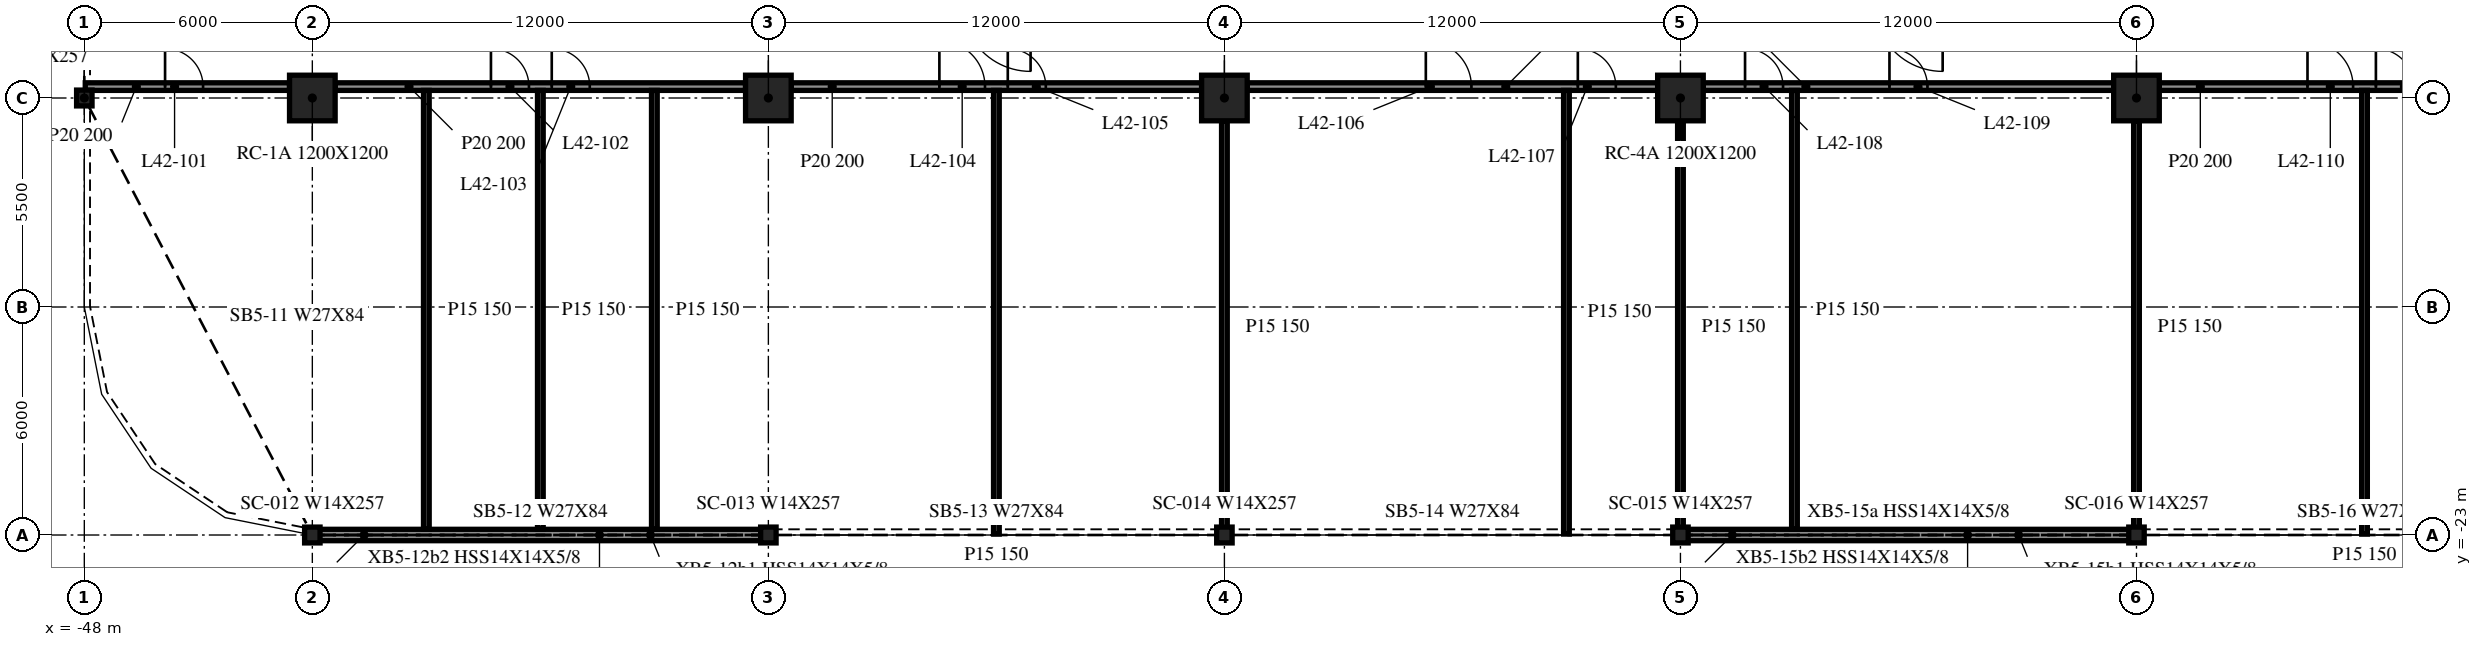
"""IFC4 building model, lengths in metres.
Left out: names, types, materials, properties, quantities, classifications, styles, units other than length and angle.
Written with IfcOpenShell. Run it as: python <this file> out.ifc"""

import sys

from ifc_helpers import new_model, si_unit, direction, frame, frame_2d, origin, origin_2d, place, context, subcontext, project, spatial, rectangle, i_section, extrude, element, fill, save


model = new_model("IFC4")
c1 = context("Model", 3, precision=1e-05, world=origin(), true_north=direction((0.0, 1.0)))
c2 = subcontext(c1, "Body", "Model", "MODEL_VIEW")
j1 = project(units=[si_unit("LENGTHUNIT", "METRE"), si_unit("PLANEANGLEUNIT", "RADIAN")], contexts=[c1])
p1 = place(None, origin())
s1 = spatial("IfcSite", under=j1, at=p1, CompositionType="ELEMENT")
p2 = place(p1, origin())
s2 = spatial("IfcBuilding", under=s1, at=p2, CompositionType="ELEMENT")
p3 = place(p2, frame((0.0, 0.0, 178.2)))
s3 = spatial("IfcBuildingStorey", under=s2, at=p3, CompositionType="ELEMENT", Elevation=178.2)
for number, where, z_axis, x_axis in (
    (1, (-42.0, -11.5, -0.34), (0.0, 0.0, 1.0), (1.0, 0.0, 0.0)),
    (2, (-30.0, -11.5, -0.34), (0.0, 0.0, 1.0), (1.0, 0.0, 0.0)),
    (3, (-18.0, -11.5, -0.34), (0.0, 0.0, 1.0), (1.0, 0.0, 0.0)),
    (4, (-6.0, -11.5, -0.34), (0.0, 0.0, 1.0), (1.0, 0.0, 0.0)),
    (5, (6.0, -11.5, -0.34), (0.0, 0.0, 1.0), (1.0, 0.0, 0.0)),
):
    element("IfcColumn", number, at=place(p3, frame(where, z_axis=z_axis, x_axis=x_axis)), inside=s3, PredefinedType="COLUMN", context=c2, shape_type="SweptSolid", body=[
        extrude(rectangle(XDim=1.2, YDim=1.2, at=origin_2d()), origin(), (0.0, 0.0, 1.0), 3.8),
    ])
for number, where, z_axis, x_axis in (
    (6, (-48.0, -11.5, -0.34), (0.0, 0.0, 1.0), (1.0, 0.0, 0.0)),
    (7, (-42.0, -23.0, -0.34), (0.0, 0.0, 1.0), (1.0, 0.0, 0.0)),
    (8, (-30.0, -23.0, -0.34), (0.0, 0.0, 1.0), (1.0, 0.0, 0.0)),
    (9, (-18.0, -23.0, -0.34), (0.0, 0.0, 1.0), (1.0, 0.0, 0.0)),
    (10, (-6.0, -23.0, -0.34), (0.0, 0.0, 1.0), (1.0, 0.0, 0.0)),
    (11, (6.0, -23.0, -0.34), (0.0, 0.0, 1.0), (1.0, 0.0, 0.0)),
):
    element("IfcColumn", number, at=place(p3, frame(where, z_axis=z_axis, x_axis=x_axis)), inside=s3, PredefinedType="COLUMN", context=c2, shape_type="SweptSolid", body=[
        extrude(i_section(OverallWidth=0.406, OverallDepth=0.417, WebThickness=0.03, FlangeThickness=0.048, at=origin_2d()), origin(), (0.0, 0.0, 1.0), 3.8),
    ])
for number, where, z_axis, x_axis in (
    (12, (-41.985, -23.0, 0.0), (0.0, 0.0, 1.0), (1.0, 0.0, 0.0)),
    (13, (-5.985, -23.0, 0.0), (0.0, 0.0, 1.0), (1.0, 0.0, 0.0)),
):
    element("IfcWall", number, at=place(p3, frame(where, z_axis=z_axis, x_axis=x_axis)), inside=s3, PredefinedType="NOTDEFINED", context=c2, shape_type="SweptSolid", body=[
        extrude(rectangle(XDim=11.97, YDim=0.3, at=frame_2d((5.985, 0.0))), origin(), (0.0, 0.0, 1.0), 2.782),
    ])
p4 = place(p3, frame((-47.975, -11.2, 0.0), z_axis=(0.0, 0.0, 1.0), x_axis=(1.0, 0.0, 0.0)))
e14 = element("IfcWall", 14, at=p4, inside=s3, PredefinedType="PARTITIONING", context=c2, shape_type="SweptSolid", body=[
    extrude(rectangle(XDim=5.375, YDim=0.2, at=frame_2d((2.688, 0.0))), origin(), (0.0, 0.0, 1.0), 3.46),
])
p5 = place(p4, frame((2.1, 0.0, 0.0)))
e15 = element("IfcOpeningElement", 15, at=p5, cuts=e14, PredefinedType="OPENING", context=c2, shape_type="SweptSolid", body=[
    extrude(rectangle(XDim=1.0, YDim=2.1, at=frame_2d((0.5, 1.05))), frame((0.0, 0.11, 0.0), z_axis=(0.0, -1.0, 0.0), x_axis=(1.0, 0.0, 0.0)), (0.0, 0.0, 1.0), 0.22),
])
p6 = place(p3, frame((-41.4, -11.2, 0.0), z_axis=(0.0, 0.0, 1.0), x_axis=(1.0, 0.0, 0.0)))
e16 = element("IfcWall", 16, at=p6, inside=s3, PredefinedType="PARTITIONING", context=c2, shape_type="SweptSolid", body=[
    extrude(rectangle(XDim=10.8, YDim=0.2, at=frame_2d((5.4, 0.0))), origin(), (0.0, 0.0, 1.0), 3.46),
])
p7 = place(p6, frame((4.1, 0.0, 0.0)))
e17 = element("IfcOpeningElement", 17, at=p7, cuts=e16, PredefinedType="OPENING", context=c2, shape_type="SweptSolid", body=[
    extrude(rectangle(XDim=1.0, YDim=2.1, at=frame_2d((0.5, 1.05))), frame((0.0, 0.11, 0.0), z_axis=(0.0, -1.0, 0.0), x_axis=(1.0, 0.0, 0.0)), (0.0, 0.0, 1.0), 0.22),
])
p8 = place(p6, frame((5.7, 0.0, 0.0)))
e18 = element("IfcOpeningElement", 18, at=p8, cuts=e16, PredefinedType="OPENING", context=c2, shape_type="SweptSolid", body=[
    extrude(rectangle(XDim=1.0, YDim=2.1, at=frame_2d((0.5, 1.05))), frame((0.0, 0.11, 0.0), z_axis=(0.0, -1.0, 0.0), x_axis=(1.0, 0.0, 0.0)), (0.0, 0.0, 1.0), 0.22),
])
p9 = place(p3, frame((-29.4, -11.2, 0.0), z_axis=(0.0, 0.0, 1.0), x_axis=(1.0, 0.0, 0.0)))
e19 = element("IfcWall", 19, at=p9, inside=s3, PredefinedType="PARTITIONING", context=c2, shape_type="SweptSolid", body=[
    extrude(rectangle(XDim=10.8, YDim=0.2, at=frame_2d((5.4, 0.0))), origin(), (0.0, 0.0, 1.0), 3.46),
])
p10 = place(p9, frame((3.9, 0.0, 0.0)))
e20 = element("IfcOpeningElement", 20, at=p10, cuts=e19, PredefinedType="OPENING", context=c2, shape_type="SweptSolid", body=[
    extrude(rectangle(XDim=1.2, YDim=2.1, at=frame_2d((0.6, 1.05))), frame((0.0, 0.11, 0.0), z_axis=(0.0, -1.0, 0.0), x_axis=(1.0, 0.0, 0.0)), (0.0, 0.0, 1.0), 0.22),
])
p11 = place(p9, frame((5.7, 0.0, 0.0)))
e21 = element("IfcOpeningElement", 21, at=p11, cuts=e19, PredefinedType="OPENING", context=c2, shape_type="SweptSolid", body=[
    extrude(rectangle(XDim=1.0, YDim=2.1, at=frame_2d((0.5, 1.05))), frame((0.0, 0.11, 0.0), z_axis=(0.0, -1.0, 0.0), x_axis=(1.0, 0.0, 0.0)), (0.0, 0.0, 1.0), 0.22),
])
p12 = place(p3, frame((-17.4, -11.2, 0.0), z_axis=(0.0, 0.0, 1.0), x_axis=(1.0, 0.0, 0.0)))
e22 = element("IfcWall", 22, at=p12, inside=s3, PredefinedType="PARTITIONING", context=c2, shape_type="SweptSolid", body=[
    extrude(rectangle(XDim=10.8, YDim=0.2, at=frame_2d((5.4, 0.0))), origin(), (0.0, 0.0, 1.0), 3.46),
])
p13 = place(p12, frame((4.7, 0.0, 0.0)))
e23 = element("IfcOpeningElement", 23, at=p13, cuts=e22, PredefinedType="OPENING", context=c2, shape_type="SweptSolid", body=[
    extrude(rectangle(XDim=1.2, YDim=2.1, at=frame_2d((0.6, 1.05))), frame((0.0, 0.11, 0.0), z_axis=(0.0, -1.0, 0.0), x_axis=(1.0, 0.0, 0.0)), (0.0, 0.0, 1.0), 0.22),
])
p14 = place(p12, frame((8.7, 0.0, 0.0)))
e24 = element("IfcOpeningElement", 24, at=p14, cuts=e22, PredefinedType="OPENING", context=c2, shape_type="SweptSolid", body=[
    extrude(rectangle(XDim=1.0, YDim=2.1, at=frame_2d((0.5, 1.05))), frame((0.0, 0.11, 0.0), z_axis=(0.0, -1.0, 0.0), x_axis=(1.0, 0.0, 0.0)), (0.0, 0.0, 1.0), 0.22),
])
p15 = place(p3, frame((-5.4, -11.2, 0.0), z_axis=(0.0, 0.0, 1.0), x_axis=(1.0, 0.0, 0.0)))
e25 = element("IfcWall", 25, at=p15, inside=s3, PredefinedType="PARTITIONING", context=c2, shape_type="SweptSolid", body=[
    extrude(rectangle(XDim=10.8, YDim=0.2, at=frame_2d((5.4, 0.0))), origin(), (0.0, 0.0, 1.0), 3.46),
])
p16 = place(p15, frame((1.1, 0.0, 0.0)))
e26 = element("IfcOpeningElement", 26, at=p16, cuts=e25, PredefinedType="OPENING", context=c2, shape_type="SweptSolid", body=[
    extrude(rectangle(XDim=1.0, YDim=2.1, at=frame_2d((0.5, 1.05))), frame((0.0, 0.11, 0.0), z_axis=(0.0, -1.0, 0.0), x_axis=(1.0, 0.0, 0.0)), (0.0, 0.0, 1.0), 0.22),
])
p17 = place(p15, frame((4.9, 0.0, 0.0)))
e27 = element("IfcOpeningElement", 27, at=p17, cuts=e25, PredefinedType="OPENING", context=c2, shape_type="SweptSolid", body=[
    extrude(rectangle(XDim=1.0, YDim=2.1, at=frame_2d((0.5, 1.05))), frame((0.0, 0.11, 0.0), z_axis=(0.0, -1.0, 0.0), x_axis=(1.0, 0.0, 0.0)), (0.0, 0.0, 1.0), 0.22),
])
p18 = place(p3, frame((6.6, -11.2, 0.0), z_axis=(0.0, 0.0, 1.0), x_axis=(1.0, 0.0, 0.0)))
e28 = element("IfcWall", 28, at=p18, inside=s3, PredefinedType="PARTITIONING", context=c2, shape_type="SweptSolid", body=[
    extrude(rectangle(XDim=10.8, YDim=0.2, at=frame_2d((5.4, 0.0))), origin(), (0.0, 0.0, 1.0), 3.46),
])
p19 = place(p18, frame((3.9, 0.0, 0.0)))
e29 = element("IfcOpeningElement", 29, at=p19, cuts=e28, PredefinedType="OPENING", context=c2, shape_type="SweptSolid", body=[
    extrude(rectangle(XDim=1.2, YDim=2.1, at=frame_2d((0.6, 1.05))), frame((0.0, 0.11, 0.0), z_axis=(0.0, -1.0, 0.0), x_axis=(1.0, 0.0, 0.0)), (0.0, 0.0, 1.0), 0.22),
])
p20 = place(p18, frame((5.7, 0.0, 0.0)))
e30 = element("IfcOpeningElement", 30, at=p20, cuts=e28, PredefinedType="OPENING", context=c2, shape_type="SweptSolid", body=[
    extrude(rectangle(XDim=1.0, YDim=2.1, at=frame_2d((0.5, 1.05))), frame((0.0, 0.11, 0.0), z_axis=(0.0, -1.0, 0.0), x_axis=(1.0, 0.0, 0.0)), (0.0, 0.0, 1.0), 0.22),
])
for number, where, z_axis, x_axis in (
    (31, (-39.0, -22.85, 0.0), (0.0, 0.0, 1.0), (0.0, 1.0, 0.0)),
    (32, (-36.0, -22.85, 0.0), (0.0, 0.0, 1.0), (0.0, 1.0, 0.0)),
    (33, (-33.0, -22.85, 0.0), (0.0, 0.0, 1.0), (0.0, 1.0, 0.0)),
):
    element("IfcWall", number, at=place(p3, frame(where, z_axis=z_axis, x_axis=x_axis)), inside=s3, PredefinedType="PARTITIONING", context=c2, shape_type="SweptSolid", body=[
        extrude(rectangle(XDim=11.55, YDim=0.15, at=frame_2d((5.775, 0.0))), origin(), (0.0, 0.0, 1.0), 3.46),
    ])
p21 = place(p3, frame((-24.0, -22.975, 0.0), z_axis=(0.0, 0.0, 1.0), x_axis=(0.0, 1.0, 0.0)))
e34 = element("IfcWall", 34, at=p21, inside=s3, PredefinedType="PARTITIONING", context=c2, shape_type="SweptSolid", body=[
    extrude(rectangle(XDim=11.675, YDim=0.15, at=frame_2d((5.837, 0.0))), origin(), (0.0, 0.0, 1.0), 3.46),
])
p22 = place(p3, frame((-18.0, -22.975, 0.0), z_axis=(0.0, 0.0, 1.0), x_axis=(0.0, 1.0, 0.0)))
e35 = element("IfcWall", 35, at=p22, inside=s3, PredefinedType="PARTITIONING", context=c2, shape_type="SweptSolid", body=[
    extrude(rectangle(XDim=10.875, YDim=0.15, at=frame_2d((5.438, 0.0))), origin(), (0.0, 0.0, 1.0), 3.46),
])
p23 = place(p3, frame((-9.0, -22.975, 0.0), z_axis=(0.0, 0.0, 1.0), x_axis=(0.0, 1.0, 0.0)))
e36 = element("IfcWall", 36, at=p23, inside=s3, PredefinedType="PARTITIONING", context=c2, shape_type="SweptSolid", body=[
    extrude(rectangle(XDim=11.675, YDim=0.15, at=frame_2d((5.837, 0.0))), origin(), (0.0, 0.0, 1.0), 3.46),
])
p24 = place(p3, frame((-6.0, -22.975, 0.0), z_axis=(0.0, 0.0, 1.0), x_axis=(0.0, 1.0, 0.0)))
e37 = element("IfcWall", 37, at=p24, inside=s3, PredefinedType="PARTITIONING", context=c2, shape_type="SweptSolid", body=[
    extrude(rectangle(XDim=10.875, YDim=0.15, at=frame_2d((5.438, 0.0))), origin(), (0.0, 0.0, 1.0), 3.46),
])
p25 = place(p3, frame((-3.0, -22.85, 0.0), z_axis=(0.0, 0.0, 1.0), x_axis=(0.0, 1.0, 0.0)))
e38 = element("IfcWall", 38, at=p25, inside=s3, PredefinedType="PARTITIONING", context=c2, shape_type="SweptSolid", body=[
    extrude(rectangle(XDim=11.55, YDim=0.15, at=frame_2d((5.775, 0.0))), origin(), (0.0, 0.0, 1.0), 3.46),
])
p26 = place(p3, frame((6.0, -22.975, 0.0), z_axis=(0.0, 0.0, 1.0), x_axis=(0.0, 1.0, 0.0)))
e39 = element("IfcWall", 39, at=p26, inside=s3, PredefinedType="PARTITIONING", context=c2, shape_type="SweptSolid", body=[
    extrude(rectangle(XDim=10.875, YDim=0.15, at=frame_2d((5.438, 0.0))), origin(), (0.0, 0.0, 1.0), 3.46),
])
p27 = place(p3, frame((12.0, -22.975, 0.0), z_axis=(0.0, 0.0, 1.0), x_axis=(0.0, 1.0, 0.0)))
e40 = element("IfcWall", 40, at=p27, inside=s3, PredefinedType="PARTITIONING", context=c2, shape_type="SweptSolid", body=[
    extrude(rectangle(XDim=11.675, YDim=0.15, at=frame_2d((5.837, 0.0))), origin(), (0.0, 0.0, 1.0), 3.46),
])
p28 = place(p5, origin())
e41 = element("IfcDoor", 41, at=p28, inside=s3, OperationType="SINGLE_SWING_RIGHT", PredefinedType="DOOR", context=c2, shape_type="SweptSolid", body=[
    extrude(rectangle(XDim=1.0, YDim=2.1, at=frame_2d((0.5, 1.05))), frame((0.0, 0.025, 0.0), z_axis=(0.0, -1.0, 0.0), x_axis=(1.0, 0.0, 0.0)), (0.0, 0.0, 1.0), 0.05),
])
fill(e15, e41)
p29 = place(p7, origin())
e42 = element("IfcDoor", 42, at=p29, inside=s3, OperationType="SINGLE_SWING_RIGHT", PredefinedType="DOOR", context=c2, shape_type="SweptSolid", body=[
    extrude(rectangle(XDim=1.0, YDim=2.1, at=frame_2d((0.5, 1.05))), frame((0.0, 0.025, 0.0), z_axis=(0.0, -1.0, 0.0), x_axis=(1.0, 0.0, 0.0)), (0.0, 0.0, 1.0), 0.05),
])
fill(e17, e42)
p30 = place(p8, origin())
e43 = element("IfcDoor", 43, at=p30, inside=s3, OperationType="SINGLE_SWING_LEFT", PredefinedType="DOOR", context=c2, shape_type="SweptSolid", body=[
    extrude(rectangle(XDim=1.0, YDim=2.1, at=frame_2d((0.5, 1.05))), frame((0.0, 0.025, 0.0), z_axis=(0.0, -1.0, 0.0), x_axis=(1.0, 0.0, 0.0)), (0.0, 0.0, 1.0), 0.05),
])
fill(e18, e43)
p31 = place(p10, origin())
e44 = element("IfcDoor", 44, at=p31, inside=s3, OperationType="SINGLE_SWING_RIGHT", PredefinedType="DOOR", context=c2, shape_type="SweptSolid", body=[
    extrude(rectangle(XDim=1.2, YDim=2.1, at=frame_2d((0.6, 1.05))), frame((0.0, 0.025, 0.0), z_axis=(0.0, -1.0, 0.0), x_axis=(1.0, 0.0, 0.0)), (0.0, 0.0, 1.0), 0.05),
])
fill(e20, e44)
p32 = place(p11, origin())
e45 = element("IfcDoor", 45, at=p32, inside=s3, OperationType="SINGLE_SWING_LEFT", PredefinedType="DOOR", context=c2, shape_type="SweptSolid", body=[
    extrude(rectangle(XDim=1.0, YDim=2.1, at=frame_2d((0.5, 1.05))), frame((0.0, 0.025, 0.0), z_axis=(0.0, -1.0, 0.0), x_axis=(1.0, 0.0, 0.0)), (0.0, 0.0, 1.0), 0.05),
])
fill(e21, e45)
p33 = place(p13, origin())
e46 = element("IfcDoor", 46, at=p33, inside=s3, OperationType="SINGLE_SWING_RIGHT", PredefinedType="DOOR", context=c2, shape_type="SweptSolid", body=[
    extrude(rectangle(XDim=1.2, YDim=2.1, at=frame_2d((0.6, 1.05))), frame((0.0, 0.025, 0.0), z_axis=(0.0, -1.0, 0.0), x_axis=(1.0, 0.0, 0.0)), (0.0, 0.0, 1.0), 0.05),
])
fill(e23, e46)
p34 = place(p14, origin())
e47 = element("IfcDoor", 47, at=p34, inside=s3, OperationType="SINGLE_SWING_LEFT", PredefinedType="DOOR", context=c2, shape_type="SweptSolid", body=[
    extrude(rectangle(XDim=1.0, YDim=2.1, at=frame_2d((0.5, 1.05))), frame((0.0, 0.025, 0.0), z_axis=(0.0, -1.0, 0.0), x_axis=(1.0, 0.0, 0.0)), (0.0, 0.0, 1.0), 0.05),
])
fill(e24, e47)
p35 = place(p16, origin())
e48 = element("IfcDoor", 48, at=p35, inside=s3, OperationType="SINGLE_SWING_RIGHT", PredefinedType="DOOR", context=c2, shape_type="SweptSolid", body=[
    extrude(rectangle(XDim=1.0, YDim=2.1, at=frame_2d((0.5, 1.05))), frame((0.0, 0.025, 0.0), z_axis=(0.0, -1.0, 0.0), x_axis=(1.0, 0.0, 0.0)), (0.0, 0.0, 1.0), 0.05),
])
fill(e26, e48)
p36 = place(p17, origin())
e49 = element("IfcDoor", 49, at=p36, inside=s3, OperationType="SINGLE_SWING_RIGHT", PredefinedType="DOOR", context=c2, shape_type="SweptSolid", body=[
    extrude(rectangle(XDim=1.0, YDim=2.1, at=frame_2d((0.5, 1.05))), frame((0.0, 0.025, 0.0), z_axis=(0.0, -1.0, 0.0), x_axis=(1.0, 0.0, 0.0)), (0.0, 0.0, 1.0), 0.05),
])
fill(e27, e49)
p37 = place(p19, origin())
e50 = element("IfcDoor", 50, at=p37, inside=s3, OperationType="SINGLE_SWING_RIGHT", PredefinedType="DOOR", context=c2, shape_type="SweptSolid", body=[
    extrude(rectangle(XDim=1.2, YDim=2.1, at=frame_2d((0.6, 1.05))), frame((0.0, 0.025, 0.0), z_axis=(0.0, -1.0, 0.0), x_axis=(1.0, 0.0, 0.0)), (0.0, 0.0, 1.0), 0.05),
])
fill(e29, e50)
p38 = place(p20, origin())
e51 = element("IfcDoor", 51, at=p38, inside=s3, OperationType="SINGLE_SWING_LEFT", PredefinedType="DOOR", context=c2, shape_type="SweptSolid", body=[
    extrude(rectangle(XDim=1.0, YDim=2.1, at=frame_2d((0.5, 1.05))), frame((0.0, 0.025, 0.0), z_axis=(0.0, -1.0, 0.0), x_axis=(1.0, 0.0, 0.0)), (0.0, 0.0, 1.0), 0.05),
])
fill(e30, e51)
save(model, sys.argv[1])
